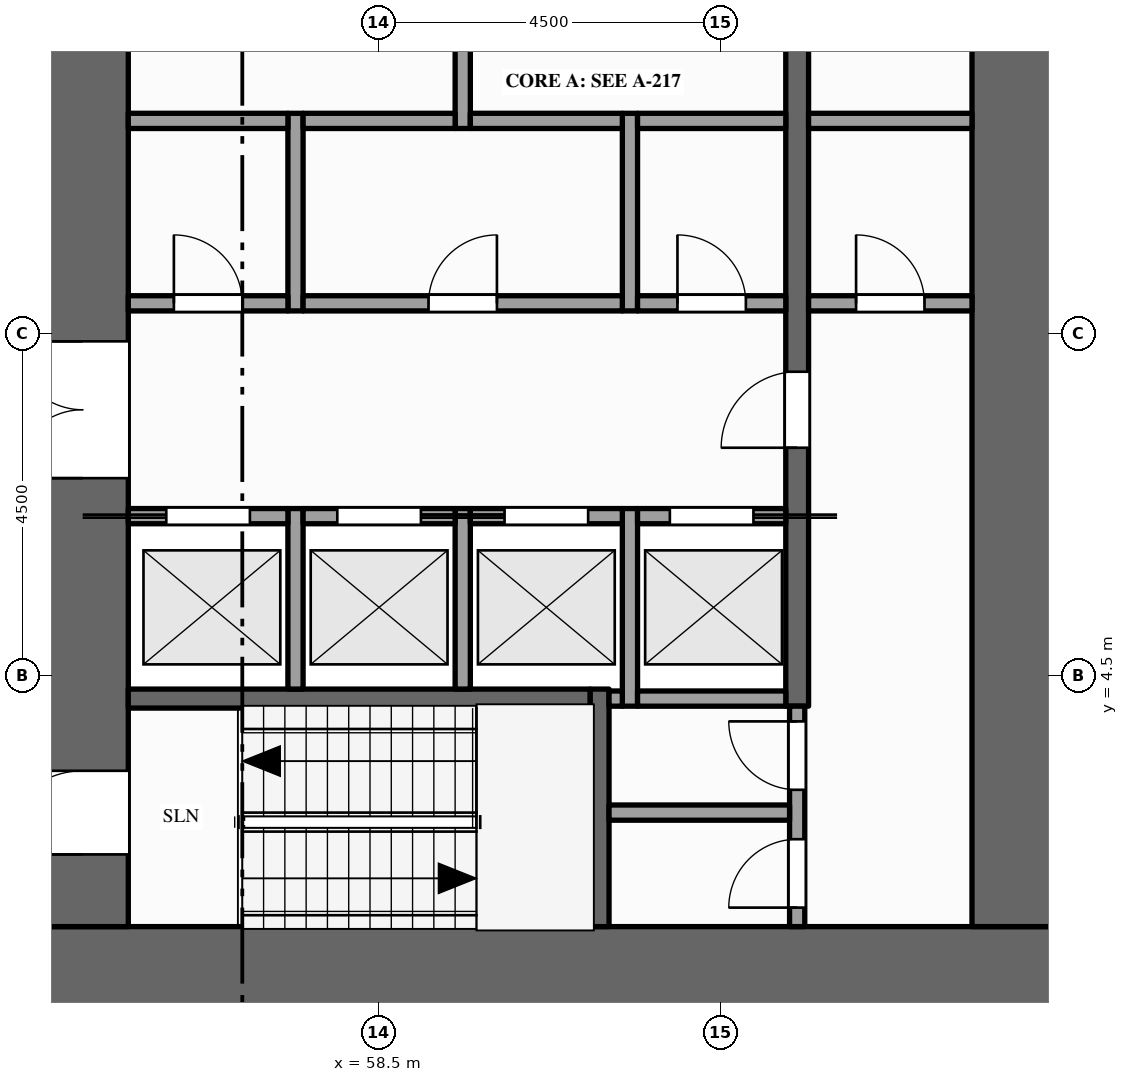
"""IFC4 building model, lengths in metres.
Left out: names, types, materials, properties, quantities, classifications, styles, units other than length and angle.
Written with IfcOpenShell. Run it as: python <this file> out.ifc"""

import sys

from ifc_helpers import new_model, si_unit, direction, frame, frame_2d, origin, place, context, subcontext, project, spatial, rectangle, extrude, element, fill, save


model = new_model("IFC4")
c1 = context("Model", 3, precision=1e-05, world=origin(), true_north=direction((0.0, 1.0)))
c2 = subcontext(c1, "Body", "Model", "MODEL_VIEW")
j1 = project(units=[si_unit("LENGTHUNIT", "METRE"), si_unit("PLANEANGLEUNIT", "RADIAN")], contexts=[c1])
p1 = place(None, origin())
s1 = spatial("IfcSite", under=j1, at=p1, CompositionType="ELEMENT")
p2 = place(p1, origin())
s2 = spatial("IfcBuilding", under=s1, at=p2, CompositionType="ELEMENT")
p3 = place(p2, frame((0.0, 0.0, 95.0)))
s3 = spatial("IfcBuildingStorey", under=s2, at=p3, CompositionType="ELEMENT", Elevation=95.0)
p4 = place(p3, frame((67.5, 0.6, -0.15), z_axis=(0.0, 0.0, 1.0), x_axis=(-1.0, 0.0, 0.0)))
e1 = element("IfcWall", 1, at=p4, inside=s3, PredefinedType="SHEAR", context=c2, shape_type="SweptSolid", body=[
    extrude(rectangle(XDim=13.5, YDim=1.2, at=frame_2d((6.75, 0.0))), origin(), (0.0, 0.0, 1.0), 4.0),
])
p5 = place(p3, frame((54.6, 1.2, -0.15), z_axis=(0.0, 0.0, 1.0), x_axis=(0.0, 1.0, 0.0)))
e2 = element("IfcWall", 2, at=p5, inside=s3, PredefinedType="SHEAR", context=c2, shape_type="SweptSolid", body=[
    extrude(rectangle(XDim=20.1, YDim=1.2, at=frame_2d((10.05, 0.0))), origin(), (0.0, 0.0, 1.0), 4.0),
])
p6 = place(p5, frame((5.9, 0.0, 0.15)))
e3 = element("IfcOpeningElement", 3, at=p6, cuts=e2, PredefinedType="OPENING", context=c2, shape_type="SweptSolid", body=[
    extrude(rectangle(XDim=1.8, YDim=2.1, at=frame_2d((0.9, 1.05))), frame((0.0, 0.61, 0.0), z_axis=(0.0, -1.0, 0.0), x_axis=(1.0, 0.0, 0.0)), (0.0, 0.0, 1.0), 1.22),
])
p7 = place(p5, frame((11.95, 0.0, 0.15)))
e4 = element("IfcOpeningElement", 4, at=p7, cuts=e2, PredefinedType="OPENING", context=c2, shape_type="SweptSolid", body=[
    extrude(rectangle(XDim=1.1, YDim=2.1, at=frame_2d((0.55, 1.05))), frame((0.0, 0.61, 0.0), z_axis=(0.0, -1.0, 0.0), x_axis=(1.0, 0.0, 0.0)), (0.0, 0.0, 1.0), 1.22),
])
p8 = place(p5, frame((0.95, 0.0, 0.15)))
e5 = element("IfcOpeningElement", 5, at=p8, cuts=e2, PredefinedType="OPENING", context=c2, shape_type="SweptSolid", body=[
    extrude(rectangle(XDim=1.1, YDim=2.1, at=frame_2d((0.55, 1.05))), frame((0.0, 0.61, 0.0), z_axis=(0.0, -1.0, 0.0), x_axis=(1.0, 0.0, 0.0)), (0.0, 0.0, 1.0), 1.22),
])
p9 = place(p5, frame((18.15, 0.0, 0.15)))
e6 = element("IfcOpeningElement", 6, at=p9, cuts=e2, PredefinedType="OPENING", context=c2, shape_type="SweptSolid", body=[
    extrude(rectangle(XDim=1.1, YDim=2.1, at=frame_2d((0.55, 1.05))), frame((0.0, 0.61, 0.0), z_axis=(0.0, -1.0, 0.0), x_axis=(1.0, 0.0, 0.0)), (0.0, 0.0, 1.0), 1.22),
])
p10 = place(p3, frame((66.9, 1.2, -0.15), z_axis=(0.0, 0.0, 1.0), x_axis=(0.0, 1.0, 0.0)))
e7 = element("IfcWall", 7, at=p10, inside=s3, PredefinedType="SHEAR", context=c2, shape_type="SweptSolid", body=[
    extrude(rectangle(XDim=20.1, YDim=1.2, at=frame_2d((10.05, 0.0))), origin(), (0.0, 0.0, 1.0), 4.0),
])
p11 = place(p3, frame((57.4, 4.325, 0.0), z_axis=(0.0, 0.0, 1.0), x_axis=(0.0, 1.0, 0.0)))
e8 = element("IfcWall", 8, at=p11, inside=s3, PredefinedType="SOLIDWALL", context=c2, shape_type="SweptSolid", body=[
    extrude(rectangle(XDim=2.375, YDim=0.2, at=frame_2d((1.188, 0.0))), origin(), (0.0, 0.0, 1.0), 3.85),
])
p12 = place(p3, frame((57.4, 9.3, 0.0), z_axis=(0.0, 0.0, 1.0), x_axis=(0.0, 1.0, 0.0)))
e9 = element("IfcWall", 9, at=p12, inside=s3, PredefinedType="PARTITIONING", context=c2, shape_type="SweptSolid", body=[
    extrude(rectangle(XDim=2.6, YDim=0.2, at=frame_2d((1.3, 0.0))), origin(), (0.0, 0.0, 1.0), 3.85),
])
p13 = place(p3, frame((59.6, 4.325, 0.0), z_axis=(0.0, 0.0, 1.0), x_axis=(0.0, 1.0, 0.0)))
e10 = element("IfcWall", 10, at=p13, inside=s3, PredefinedType="SOLIDWALL", context=c2, shape_type="SweptSolid", body=[
    extrude(rectangle(XDim=2.375, YDim=0.2, at=frame_2d((1.188, 0.0))), origin(), (0.0, 0.0, 1.0), 3.85),
])
p14 = place(p3, frame((59.6, 11.7, 0.0), z_axis=(0.0, 0.0, 1.0), x_axis=(0.0, 1.0, 0.0)))
e11 = element("IfcWall", 11, at=p14, inside=s3, PredefinedType="PARTITIONING", context=c2, shape_type="SweptSolid", body=[
    extrude(rectangle(XDim=3.8, YDim=0.2, at=frame_2d((1.9, 0.0))), origin(), (0.0, 0.0, 1.0), 3.85),
])
p15 = place(p14, frame((1.5, 0.0, 0.0)))
e12 = element("IfcOpeningElement", 12, at=p15, cuts=e11, PredefinedType="OPENING", context=c2, shape_type="SweptSolid", body=[
    extrude(rectangle(XDim=1.0, YDim=2.1, at=frame_2d((0.5, 1.05))), frame((0.0, 0.11, 0.0), z_axis=(0.0, -1.0, 0.0), x_axis=(1.0, 0.0, 0.0)), (0.0, 0.0, 1.0), 0.22),
])
p16 = place(p3, frame((61.4, 1.2, 0.0), z_axis=(0.0, 0.0, 1.0), x_axis=(0.0, 1.0, 0.0)))
e13 = element("IfcWall", 13, at=p16, inside=s3, PredefinedType="SHEAR", context=c2, shape_type="SweptSolid", body=[
    extrude(rectangle(XDim=3.125, YDim=0.25, at=frame_2d((1.562, 0.0))), origin(), (0.0, 0.0, 1.0), 3.85),
])
p17 = place(p3, frame((61.8, 4.1, 0.0), z_axis=(0.0, 0.0, 1.0), x_axis=(0.0, 1.0, 0.0)))
e14 = element("IfcWall", 14, at=p17, inside=s3, PredefinedType="SOLIDWALL", context=c2, shape_type="SweptSolid", body=[
    extrude(rectangle(XDim=2.6, YDim=0.2, at=frame_2d((1.3, 0.0))), origin(), (0.0, 0.0, 1.0), 3.85),
])
p18 = place(p3, frame((61.8, 9.3, 0.0), z_axis=(0.0, 0.0, 1.0), x_axis=(0.0, 1.0, 0.0)))
e15 = element("IfcWall", 15, at=p18, inside=s3, PredefinedType="PARTITIONING", context=c2, shape_type="SweptSolid", body=[
    extrude(rectangle(XDim=2.6, YDim=0.2, at=frame_2d((1.3, 0.0))), origin(), (0.0, 0.0, 1.0), 3.85),
])
p19 = place(p3, frame((64.0, 1.2, 0.0), z_axis=(0.0, 0.0, 1.0), x_axis=(0.0, 1.0, 0.0)))
e16 = element("IfcWall", 16, at=p19, inside=s3, PredefinedType="PARTITIONING", context=c2, shape_type="SweptSolid", body=[
    extrude(rectangle(XDim=2.9, YDim=0.2, at=frame_2d((1.45, 0.0))), origin(), (0.0, 0.0, 1.0), 3.85),
])
p20 = place(p19, frame((0.25, 0.0, 0.0)))
e17 = element("IfcOpeningElement", 17, at=p20, cuts=e16, PredefinedType="OPENING", context=c2, shape_type="SweptSolid", body=[
    extrude(rectangle(XDim=0.9, YDim=2.1, at=frame_2d((0.45, 1.05))), frame((0.0, 0.11, 0.0), z_axis=(0.0, -1.0, 0.0), x_axis=(1.0, 0.0, 0.0)), (0.0, 0.0, 1.0), 0.22),
])
p21 = place(p19, frame((1.8, 0.0, 0.0)))
e18 = element("IfcOpeningElement", 18, at=p21, cuts=e16, PredefinedType="OPENING", context=c2, shape_type="SweptSolid", body=[
    extrude(rectangle(XDim=0.9, YDim=2.1, at=frame_2d((0.45, 1.05))), frame((0.0, 0.11, 0.0), z_axis=(0.0, -1.0, 0.0), x_axis=(1.0, 0.0, 0.0)), (0.0, 0.0, 1.0), 0.22),
])
p22 = place(p3, frame((64.0, 4.1, 0.0), z_axis=(0.0, 0.0, 1.0), x_axis=(0.0, 1.0, 0.0)))
e19 = element("IfcWall", 19, at=p22, inside=s3, PredefinedType="SHEAR", context=c2, shape_type="SweptSolid", body=[
    extrude(rectangle(XDim=14.5, YDim=0.3, at=frame_2d((7.25, 0.0))), origin(), (0.0, 0.0, 1.0), 3.85),
])
p23 = place(p22, frame((3.4, 0.0, 0.0)))
e20 = element("IfcOpeningElement", 20, at=p23, cuts=e19, PredefinedType="OPENING", context=c2, shape_type="SweptSolid", body=[
    extrude(rectangle(XDim=1.0, YDim=2.1, at=frame_2d((0.5, 1.05))), frame((0.0, 0.16, 0.0), z_axis=(0.0, -1.0, 0.0), x_axis=(1.0, 0.0, 0.0)), (0.0, 0.0, 1.0), 0.32),
])
p24 = place(p22, frame((9.1, 0.0, 0.0)))
e21 = element("IfcOpeningElement", 21, at=p24, cuts=e19, PredefinedType="OPENING", context=c2, shape_type="SweptSolid", body=[
    extrude(rectangle(XDim=1.0, YDim=2.1, at=frame_2d((0.5, 1.05))), frame((0.0, 0.16, 0.0), z_axis=(0.0, -1.0, 0.0), x_axis=(1.0, 0.0, 0.0)), (0.0, 0.0, 1.0), 0.32),
])
p25 = place(p3, frame((61.525, 2.7, 0.0), z_axis=(0.0, 0.0, 1.0), x_axis=(1.0, 0.0, 0.0)))
e22 = element("IfcWall", 22, at=p25, inside=s3, PredefinedType="PARTITIONING", context=c2, shape_type="SweptSolid", body=[
    extrude(rectangle(XDim=2.375, YDim=0.2, at=frame_2d((1.188, 0.0))), origin(), (0.0, 0.0, 1.0), 3.85),
])
p26 = place(p3, frame((55.2, 4.2, 0.0), z_axis=(0.0, 0.0, 1.0), x_axis=(1.0, 0.0, 0.0)))
e23 = element("IfcWall", 23, at=p26, inside=s3, PredefinedType="SHEAR", context=c2, shape_type="SweptSolid", body=[
    extrude(rectangle(XDim=6.075, YDim=0.25, at=frame_2d((3.038, 0.0))), origin(), (0.0, 0.0, 1.0), 3.85),
])
p27 = place(p3, frame((61.525, 4.2, 0.0), z_axis=(0.0, 0.0, 1.0), x_axis=(1.0, 0.0, 0.0)))
e24 = element("IfcWall", 24, at=p27, inside=s3, PredefinedType="SOLIDWALL", context=c2, shape_type="SweptSolid", body=[
    extrude(rectangle(XDim=0.175, YDim=0.2, at=frame_2d((0.087, 0.0))), origin(), (0.0, 0.0, 1.0), 3.85),
])
p28 = place(p3, frame((61.9, 4.2, 0.0), z_axis=(0.0, 0.0, 1.0), x_axis=(1.0, 0.0, 0.0)))
e25 = element("IfcWall", 25, at=p28, inside=s3, PredefinedType="SOLIDWALL", context=c2, shape_type="SweptSolid", body=[
    extrude(rectangle(XDim=1.95, YDim=0.2, at=frame_2d((0.975, 0.0))), origin(), (0.0, 0.0, 1.0), 3.85),
])
p29 = place(p3, frame((55.2, 6.6, 0.0), z_axis=(0.0, 0.0, 1.0), x_axis=(1.0, 0.0, 0.0)))
e26 = element("IfcWall", 26, at=p29, inside=s3, PredefinedType="SOLIDWALL", context=c2, shape_type="SweptSolid", body=[
    extrude(rectangle(XDim=2.1, YDim=0.2, at=frame_2d((1.05, 0.0))), origin(), (0.0, 0.0, 1.0), 3.85),
])
p30 = place(p29, frame((0.5, 0.0, 0.012)))
e27 = element("IfcOpeningElement", 27, at=p30, cuts=e26, PredefinedType="OPENING", context=c2, shape_type="SweptSolid", body=[
    extrude(rectangle(XDim=1.1, YDim=2.1, at=frame_2d((0.55, 1.05))), frame((0.0, 0.11, 0.0), z_axis=(0.0, -1.0, 0.0), x_axis=(1.0, 0.0, 0.0)), (0.0, 0.0, 1.0), 0.22),
])
p31 = place(p3, frame((57.5, 6.6, 0.0), z_axis=(0.0, 0.0, 1.0), x_axis=(1.0, 0.0, 0.0)))
e28 = element("IfcWall", 28, at=p31, inside=s3, PredefinedType="SOLIDWALL", context=c2, shape_type="SweptSolid", body=[
    extrude(rectangle(XDim=2.0, YDim=0.2, at=frame_2d((1.0, 0.0))), origin(), (0.0, 0.0, 1.0), 3.85),
])
p32 = place(p31, frame((0.45, 0.0, 0.012)))
e29 = element("IfcOpeningElement", 29, at=p32, cuts=e28, PredefinedType="OPENING", context=c2, shape_type="SweptSolid", body=[
    extrude(rectangle(XDim=1.1, YDim=2.1, at=frame_2d((0.55, 1.05))), frame((0.0, 0.11, 0.0), z_axis=(0.0, -1.0, 0.0), x_axis=(1.0, 0.0, 0.0)), (0.0, 0.0, 1.0), 0.22),
])
p33 = place(p3, frame((59.7, 6.6, 0.0), z_axis=(0.0, 0.0, 1.0), x_axis=(1.0, 0.0, 0.0)))
e30 = element("IfcWall", 30, at=p33, inside=s3, PredefinedType="SOLIDWALL", context=c2, shape_type="SweptSolid", body=[
    extrude(rectangle(XDim=2.0, YDim=0.2, at=frame_2d((1.0, 0.0))), origin(), (0.0, 0.0, 1.0), 3.85),
])
p34 = place(p33, frame((0.45, 0.0, 0.012)))
e31 = element("IfcOpeningElement", 31, at=p34, cuts=e30, PredefinedType="OPENING", context=c2, shape_type="SweptSolid", body=[
    extrude(rectangle(XDim=1.1, YDim=2.1, at=frame_2d((0.55, 1.05))), frame((0.0, 0.11, 0.0), z_axis=(0.0, -1.0, 0.0), x_axis=(1.0, 0.0, 0.0)), (0.0, 0.0, 1.0), 0.22),
])
p35 = place(p3, frame((61.9, 6.6, 0.0), z_axis=(0.0, 0.0, 1.0), x_axis=(1.0, 0.0, 0.0)))
e32 = element("IfcWall", 32, at=p35, inside=s3, PredefinedType="SOLIDWALL", context=c2, shape_type="SweptSolid", body=[
    extrude(rectangle(XDim=1.95, YDim=0.2, at=frame_2d((0.975, 0.0))), origin(), (0.0, 0.0, 1.0), 3.85),
])
p36 = place(p35, frame((0.425, 0.0, 0.012)))
e33 = element("IfcOpeningElement", 33, at=p36, cuts=e32, PredefinedType="OPENING", context=c2, shape_type="SweptSolid", body=[
    extrude(rectangle(XDim=1.1, YDim=2.1, at=frame_2d((0.55, 1.05))), frame((0.0, 0.11, 0.0), z_axis=(0.0, -1.0, 0.0), x_axis=(1.0, 0.0, 0.0)), (0.0, 0.0, 1.0), 0.22),
])
p37 = place(p3, frame((55.2, 9.4, 0.0), z_axis=(0.0, 0.0, 1.0), x_axis=(1.0, 0.0, 0.0)))
e34 = element("IfcWall", 34, at=p37, inside=s3, PredefinedType="PARTITIONING", context=c2, shape_type="SweptSolid", body=[
    extrude(rectangle(XDim=2.1, YDim=0.2, at=frame_2d((1.05, 0.0))), origin(), (0.0, 0.0, 1.0), 3.85),
])
p38 = place(p37, frame((0.6, 0.0, 0.0)))
e35 = element("IfcOpeningElement", 35, at=p38, cuts=e34, PredefinedType="OPENING", context=c2, shape_type="SweptSolid", body=[
    extrude(rectangle(XDim=0.9, YDim=2.1, at=frame_2d((0.45, 1.05))), frame((0.0, 0.11, 0.0), z_axis=(0.0, -1.0, 0.0), x_axis=(1.0, 0.0, 0.0)), (0.0, 0.0, 1.0), 0.22),
])
p39 = place(p3, frame((57.5, 9.4, 0.0), z_axis=(0.0, 0.0, 1.0), x_axis=(1.0, 0.0, 0.0)))
e36 = element("IfcWall", 36, at=p39, inside=s3, PredefinedType="PARTITIONING", context=c2, shape_type="SweptSolid", body=[
    extrude(rectangle(XDim=4.2, YDim=0.2, at=frame_2d((2.1, 0.0))), origin(), (0.0, 0.0, 1.0), 3.85),
])
p40 = place(p39, frame((1.65, 0.0, 0.0)))
e37 = element("IfcOpeningElement", 37, at=p40, cuts=e36, PredefinedType="OPENING", context=c2, shape_type="SweptSolid", body=[
    extrude(rectangle(XDim=0.9, YDim=2.1, at=frame_2d((0.45, 1.05))), frame((0.0, 0.11, 0.0), z_axis=(0.0, -1.0, 0.0), x_axis=(1.0, 0.0, 0.0)), (0.0, 0.0, 1.0), 0.22),
])
p41 = place(p3, frame((61.9, 9.4, 0.0), z_axis=(0.0, 0.0, 1.0), x_axis=(1.0, 0.0, 0.0)))
e38 = element("IfcWall", 38, at=p41, inside=s3, PredefinedType="PARTITIONING", context=c2, shape_type="SweptSolid", body=[
    extrude(rectangle(XDim=1.95, YDim=0.2, at=frame_2d((0.975, 0.0))), origin(), (0.0, 0.0, 1.0), 3.85),
])
p42 = place(p41, frame((0.525, 0.0, 0.0)))
e39 = element("IfcOpeningElement", 39, at=p42, cuts=e38, PredefinedType="OPENING", context=c2, shape_type="SweptSolid", body=[
    extrude(rectangle(XDim=0.9, YDim=2.1, at=frame_2d((0.45, 1.05))), frame((0.0, 0.11, 0.0), z_axis=(0.0, -1.0, 0.0), x_axis=(1.0, 0.0, 0.0)), (0.0, 0.0, 1.0), 0.22),
])
p43 = place(p3, frame((64.15, 9.4, 0.0), z_axis=(0.0, 0.0, 1.0), x_axis=(1.0, 0.0, 0.0)))
e40 = element("IfcWall", 40, at=p43, inside=s3, PredefinedType="PARTITIONING", context=c2, shape_type="SweptSolid", body=[
    extrude(rectangle(XDim=2.15, YDim=0.2, at=frame_2d((1.075, 0.0))), origin(), (0.0, 0.0, 1.0), 3.85),
])
p44 = place(p43, frame((0.625, 0.0, 0.0)))
e41 = element("IfcOpeningElement", 41, at=p44, cuts=e40, PredefinedType="OPENING", context=c2, shape_type="SweptSolid", body=[
    extrude(rectangle(XDim=0.9, YDim=2.1, at=frame_2d((0.45, 1.05))), frame((0.0, 0.11, 0.0), z_axis=(0.0, -1.0, 0.0), x_axis=(1.0, 0.0, 0.0)), (0.0, 0.0, 1.0), 0.22),
])
p45 = place(p3, frame((55.2, 11.8, 0.0), z_axis=(0.0, 0.0, 1.0), x_axis=(1.0, 0.0, 0.0)))
e42 = element("IfcWall", 42, at=p45, inside=s3, PredefinedType="PARTITIONING", context=c2, shape_type="SweptSolid", body=[
    extrude(rectangle(XDim=2.1, YDim=0.2, at=frame_2d((1.05, 0.0))), origin(), (0.0, 0.0, 1.0), 3.85),
])
for number, where, z_axis, x_axis in (
    (43, (57.5, 11.8, 0.0), (0.0, 0.0, 1.0), (1.0, 0.0, 0.0)),
    (44, (59.7, 11.8, 0.0), (0.0, 0.0, 1.0), (1.0, 0.0, 0.0)),
):
    element("IfcWall", number, at=place(p3, frame(where, z_axis=z_axis, x_axis=x_axis)), inside=s3, PredefinedType="PARTITIONING", context=c2, shape_type="SweptSolid", body=[
        extrude(rectangle(XDim=2.0, YDim=0.2, at=frame_2d((1.0, 0.0))), origin(), (0.0, 0.0, 1.0), 3.85),
    ])
p46 = place(p3, frame((61.9, 11.8, 0.0), z_axis=(0.0, 0.0, 1.0), x_axis=(1.0, 0.0, 0.0)))
e45 = element("IfcWall", 45, at=p46, inside=s3, PredefinedType="PARTITIONING", context=c2, shape_type="SweptSolid", body=[
    extrude(rectangle(XDim=1.95, YDim=0.2, at=frame_2d((0.975, 0.0))), origin(), (0.0, 0.0, 1.0), 3.85),
])
p47 = place(p3, frame((64.15, 11.8, 0.0), z_axis=(0.0, 0.0, 1.0), x_axis=(1.0, 0.0, 0.0)))
e46 = element("IfcWall", 46, at=p47, inside=s3, PredefinedType="PARTITIONING", context=c2, shape_type="SweptSolid", body=[
    extrude(rectangle(XDim=2.15, YDim=0.2, at=frame_2d((1.075, 0.0))), origin(), (0.0, 0.0, 1.0), 3.85),
])
p48 = place(p30, origin())
e47 = element("IfcDoor", 47, at=p48, inside=s3, OperationType="SLIDING_TO_LEFT", PredefinedType="DOOR", context=c2, shape_type="SweptSolid", body=[
    extrude(rectangle(XDim=1.1, YDim=2.1, at=frame_2d((0.55, 1.05))), frame((0.0, 0.025, 0.0), z_axis=(0.0, -1.0, 0.0), x_axis=(1.0, 0.0, 0.0)), (0.0, 0.0, 1.0), 0.05),
])
fill(e27, e47)
p49 = place(p32, origin())
e48 = element("IfcDoor", 48, at=p49, inside=s3, OperationType="SLIDING_TO_RIGHT", PredefinedType="DOOR", context=c2, shape_type="SweptSolid", body=[
    extrude(rectangle(XDim=1.1, YDim=2.1, at=frame_2d((0.55, 1.05))), frame((0.0, 0.025, 0.0), z_axis=(0.0, -1.0, 0.0), x_axis=(1.0, 0.0, 0.0)), (0.0, 0.0, 1.0), 0.05),
])
fill(e29, e48)
p50 = place(p34, origin())
e49 = element("IfcDoor", 49, at=p50, inside=s3, OperationType="SLIDING_TO_LEFT", PredefinedType="DOOR", context=c2, shape_type="SweptSolid", body=[
    extrude(rectangle(XDim=1.1, YDim=2.1, at=frame_2d((0.55, 1.05))), frame((0.0, 0.025, 0.0), z_axis=(0.0, -1.0, 0.0), x_axis=(1.0, 0.0, 0.0)), (0.0, 0.0, 1.0), 0.05),
])
fill(e31, e49)
p51 = place(p36, origin())
e50 = element("IfcDoor", 50, at=p51, inside=s3, OperationType="SLIDING_TO_RIGHT", PredefinedType="DOOR", context=c2, shape_type="SweptSolid", body=[
    extrude(rectangle(XDim=1.1, YDim=2.1, at=frame_2d((0.55, 1.05))), frame((0.0, 0.025, 0.0), z_axis=(0.0, -1.0, 0.0), x_axis=(1.0, 0.0, 0.0)), (0.0, 0.0, 1.0), 0.05),
])
fill(e33, e50)
p52 = place(p6, origin())
e51 = element("IfcDoor", 51, at=p52, inside=s3, OperationType="DOUBLE_DOOR_SINGLE_SWING", PredefinedType="DOOR", context=c2, shape_type="SweptSolid", body=[
    extrude(rectangle(XDim=1.8, YDim=2.1, at=frame_2d((0.9, 1.05))), frame((0.0, 0.025, 0.0), z_axis=(0.0, -1.0, 0.0), x_axis=(1.0, 0.0, 0.0)), (0.0, 0.0, 1.0), 0.05),
])
fill(e3, e51)
p53 = place(p23, origin())
e52 = element("IfcDoor", 52, at=p53, inside=s3, OperationType="SINGLE_SWING_LEFT", PredefinedType="DOOR", context=c2, shape_type="SweptSolid", body=[
    extrude(rectangle(XDim=1.0, YDim=2.1, at=frame_2d((0.5, 1.05))), frame((0.0, 0.025, 0.0), z_axis=(0.0, -1.0, 0.0), x_axis=(1.0, 0.0, 0.0)), (0.0, 0.0, 1.0), 0.05),
])
fill(e20, e52)
p54 = place(p44, origin())
e53 = element("IfcDoor", 53, at=p54, inside=s3, OperationType="SINGLE_SWING_LEFT", PredefinedType="DOOR", context=c2, shape_type="SweptSolid", body=[
    extrude(rectangle(XDim=0.9, YDim=2.1, at=frame_2d((0.45, 1.05))), frame((0.0, 0.025, 0.0), z_axis=(0.0, -1.0, 0.0), x_axis=(1.0, 0.0, 0.0)), (0.0, 0.0, 1.0), 0.05),
])
fill(e41, e53)
p55 = place(p8, origin())
e54 = element("IfcDoor", 54, at=p55, inside=s3, OperationType="SINGLE_SWING_LEFT", PredefinedType="DOOR", context=c2, shape_type="SweptSolid", body=[
    extrude(rectangle(XDim=1.1, YDim=2.1, at=frame_2d((0.55, 1.05))), frame((0.0, 0.025, 0.0), z_axis=(0.0, -1.0, 0.0), x_axis=(1.0, 0.0, 0.0)), (0.0, 0.0, 1.0), 0.05),
])
fill(e5, e54)
p56 = place(p20, origin())
e55 = element("IfcDoor", 55, at=p56, inside=s3, OperationType="SINGLE_SWING_LEFT", PredefinedType="DOOR", context=c2, shape_type="SweptSolid", body=[
    extrude(rectangle(XDim=0.9, YDim=2.1, at=frame_2d((0.45, 1.05))), frame((0.0, 0.025, 0.0), z_axis=(0.0, -1.0, 0.0), x_axis=(1.0, 0.0, 0.0)), (0.0, 0.0, 1.0), 0.05),
])
fill(e17, e55)
p57 = place(p21, origin())
e56 = element("IfcDoor", 56, at=p57, inside=s3, OperationType="SINGLE_SWING_RIGHT", PredefinedType="DOOR", context=c2, shape_type="SweptSolid", body=[
    extrude(rectangle(XDim=0.9, YDim=2.1, at=frame_2d((0.45, 1.05))), frame((0.0, 0.025, 0.0), z_axis=(0.0, -1.0, 0.0), x_axis=(1.0, 0.0, 0.0)), (0.0, 0.0, 1.0), 0.05),
])
fill(e18, e56)
p58 = place(p38, origin())
e57 = element("IfcDoor", 57, at=p58, inside=s3, OperationType="SINGLE_SWING_LEFT", PredefinedType="DOOR", context=c2, shape_type="SweptSolid", body=[
    extrude(rectangle(XDim=0.9, YDim=2.1, at=frame_2d((0.45, 1.05))), frame((0.0, 0.025, 0.0), z_axis=(0.0, -1.0, 0.0), x_axis=(1.0, 0.0, 0.0)), (0.0, 0.0, 1.0), 0.05),
])
fill(e35, e57)
p59 = place(p40, origin())
e58 = element("IfcDoor", 58, at=p59, inside=s3, OperationType="SINGLE_SWING_RIGHT", PredefinedType="DOOR", context=c2, shape_type="SweptSolid", body=[
    extrude(rectangle(XDim=0.9, YDim=2.1, at=frame_2d((0.45, 1.05))), frame((0.0, 0.025, 0.0), z_axis=(0.0, -1.0, 0.0), x_axis=(1.0, 0.0, 0.0)), (0.0, 0.0, 1.0), 0.05),
])
fill(e37, e58)
p60 = place(p42, origin())
e59 = element("IfcDoor", 59, at=p60, inside=s3, OperationType="SINGLE_SWING_LEFT", PredefinedType="DOOR", context=c2, shape_type="SweptSolid", body=[
    extrude(rectangle(XDim=0.9, YDim=2.1, at=frame_2d((0.45, 1.05))), frame((0.0, 0.025, 0.0), z_axis=(0.0, -1.0, 0.0), x_axis=(1.0, 0.0, 0.0)), (0.0, 0.0, 1.0), 0.05),
])
fill(e39, e59)
save(model, sys.argv[1])
